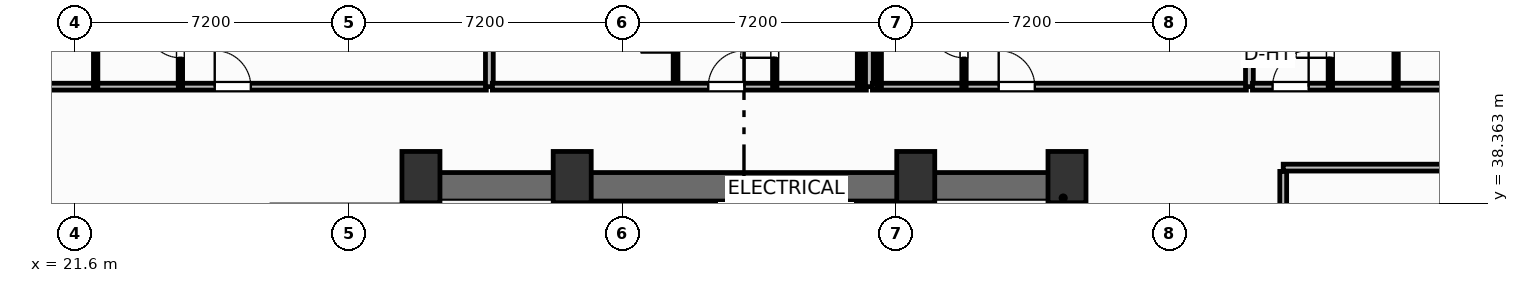
"""IFC4 building model, lengths in metres.
Left out: names, types, materials, properties, quantities, classifications, styles, units other than length and angle.
Written with IfcOpenShell. Run it as: python <this file> out.ifc"""

import sys

from ifc_helpers import new_model, si_unit, direction, frame, frame_2d, origin, origin_2d, place, context, subcontext, project, spatial, rectangle, extrude, element, fill, save


model = new_model("IFC4")
c1 = context("Model", 3, precision=1e-05, world=origin(), true_north=direction((0.0, 1.0)))
c2 = subcontext(c1, "Body", "Model", "MODEL_VIEW")
j1 = project(units=[si_unit("LENGTHUNIT", "METRE"), si_unit("PLANEANGLEUNIT", "RADIAN")], contexts=[c1])
p1 = place(None, origin())
s1 = spatial("IfcSite", under=j1, at=p1, CompositionType="ELEMENT")
p2 = place(p1, origin())
s2 = spatial("IfcBuilding", under=s1, at=p2, CompositionType="ELEMENT")
p3 = place(p2, frame((0.0, 0.0, 129.1)))
s3 = spatial("IfcBuildingStorey", under=s2, at=p3, CompositionType="ELEMENT", Elevation=129.1)
for number, where, z_axis, x_axis in (
    (1, (30.7, 39.05, 0.0), (0.0, 0.0, 1.0), (1.0, 0.0, 0.0)),
    (2, (34.68, 39.05, 0.0), (0.0, 0.0, 1.0), (1.0, 0.0, 0.0)),
    (3, (43.72, 39.05, 0.0), (0.0, 0.0, 1.0), (1.0, 0.0, 0.0)),
    (4, (47.7, 39.05, 0.0), (0.0, 0.0, 1.0), (1.0, 0.0, 0.0)),
):
    element("IfcColumn", number, at=place(p3, frame(where, z_axis=z_axis, x_axis=x_axis)), inside=s3, PredefinedType="COLUMN", context=c2, shape_type="SweptSolid", body=[
        extrude(rectangle(XDim=1.0, YDim=1.35, at=origin_2d()), origin(), (0.0, 0.0, 1.0), 3.7),
    ])
p4 = place(p3, frame((30.38, 38.795, 0.0), z_axis=(0.0, 0.0, 1.0), x_axis=(1.0, 0.0, 0.0)))
e5 = element("IfcWall", 5, at=p4, inside=s3, PredefinedType="SHEAR", context=c2, shape_type="SweptSolid", body=[
    extrude(rectangle(XDim=17.64, YDim=0.75, at=frame_2d((8.82, 0.0))), origin(), (0.0, 0.0, 1.0), 3.45),
])
for number, where, z_axis, x_axis in (
    (6, (30.755, 29.2, 0.0), (0.0, 0.0, 1.0), (0.0, 1.0, 0.0)),
    (7, (47.645, 29.2, 0.0), (0.0, 0.0, 1.0), (0.0, 1.0, 0.0)),
):
    element("IfcWall", number, at=place(p3, frame(where, z_axis=z_axis, x_axis=x_axis)), inside=s3, PredefinedType="SHEAR", context=c2, shape_type="SweptSolid", body=[
        extrude(rectangle(XDim=9.22, YDim=0.75, at=frame_2d((4.61, 0.0))), origin(), (0.0, 0.0, 1.0), 3.45),
    ])
p5 = place(p3, frame((34.64, 29.2, 0.0), z_axis=(0.0, 0.0, 1.0), x_axis=(0.0, 1.0, 0.0)))
e8 = element("IfcWall", 8, at=p5, inside=s3, PredefinedType="SHEAR", context=c2, shape_type="SweptSolid", body=[
    extrude(rectangle(XDim=9.22, YDim=0.25, at=frame_2d((4.61, 0.0))), origin(), (0.0, 0.0, 1.0), 3.45),
])
p6 = place(p5, frame((0.65, 0.0, 0.0)))
e9 = element("IfcOpeningElement", 9, at=p6, cuts=e8, PredefinedType="OPENING", context=c2, shape_type="SweptSolid", body=[
    extrude(rectangle(XDim=1.05, YDim=2.15, at=frame_2d((0.525, 1.075))), frame((0.0, 0.135, 0.0), z_axis=(0.0, -1.0, 0.0), x_axis=(1.0, 0.0, 0.0)), (0.0, 0.0, 1.0), 0.27),
])
p7 = place(p3, frame((43.76, 29.2, 0.0), z_axis=(0.0, 0.0, 1.0), x_axis=(0.0, 1.0, 0.0)))
e10 = element("IfcWall", 10, at=p7, inside=s3, PredefinedType="SHEAR", context=c2, shape_type="SweptSolid", body=[
    extrude(rectangle(XDim=9.22, YDim=0.25, at=frame_2d((4.61, 0.0))), origin(), (0.0, 0.0, 1.0), 3.45),
])
p8 = place(p7, frame((0.65, 0.0, 0.0)))
e11 = element("IfcOpeningElement", 11, at=p8, cuts=e10, PredefinedType="OPENING", context=c2, shape_type="SweptSolid", body=[
    extrude(rectangle(XDim=1.05, YDim=2.15, at=frame_2d((0.525, 1.075))), frame((0.0, 0.135, 0.0), z_axis=(0.0, -1.0, 0.0), x_axis=(1.0, 0.0, 0.0)), (0.0, 0.0, 1.0), 0.27),
])
p9 = place(p3, frame((3.864, 41.43, 0.0), z_axis=(0.0, 0.0, 1.0), x_axis=(1.0, 0.0, 0.0)))
e12 = element("IfcWall", 12, at=p9, inside=s3, PredefinedType="PARTITIONING", context=c2, shape_type="SweptSolid", body=[
    extrude(rectangle(XDim=28.556, YDim=0.18, at=frame_2d((14.278, 0.0))), origin(), (0.0, 0.0, 1.0), 3.45),
])
p10 = place(p9, frame((21.409, 0.0, 0.0)))
e13 = element("IfcOpeningElement", 13, at=p10, cuts=e12, PredefinedType="OPENING", context=c2, shape_type="SweptSolid", body=[
    extrude(rectangle(XDim=0.95, YDim=2.15, at=frame_2d((0.475, 1.075))), frame((0.0, 0.1, 0.0), z_axis=(0.0, -1.0, 0.0), x_axis=(1.0, 0.0, 0.0)), (0.0, 0.0, 1.0), 0.2),
])
p11 = place(p3, frame((24.37, 41.43, 0.0), z_axis=(0.0, 0.0, 1.0), x_axis=(0.0, 1.0, 0.0)))
e14 = element("IfcWall", 14, at=p11, inside=s3, PredefinedType="PARTITIONING", context=c2, shape_type="SweptSolid", body=[
    extrude(rectangle(XDim=2.52, YDim=0.115, at=frame_2d((1.26, 0.0))), origin(), (0.0, 0.0, 1.0), 3.45),
])
p12 = place(p11, frame((0.76, 0.0, 0.0)))
e15 = element("IfcOpeningElement", 15, at=p12, cuts=e14, PredefinedType="OPENING", context=c2, shape_type="SweptSolid", body=[
    extrude(rectangle(XDim=0.9, YDim=2.05, at=frame_2d((0.45, 1.025))), frame((0.0, 0.067, 0.0), z_axis=(0.0, -1.0, 0.0), x_axis=(1.0, 0.0, 0.0)), (0.0, 0.0, 1.0), 0.135),
])
p13 = place(p3, frame((22.14, 41.43, 0.0), z_axis=(0.0, 0.0, 1.0), x_axis=(0.0, 1.0, 0.0)))
e16 = element("IfcWall", 16, at=p13, inside=s3, PredefinedType="PARTITIONING", context=c2, shape_type="SweptSolid", body=[
    extrude(rectangle(XDim=2.52, YDim=0.115, at=frame_2d((1.26, 0.0))), origin(), (0.0, 0.0, 1.0), 3.45),
])
p14 = place(p3, frame((32.5, 41.43, 0.0), z_axis=(0.0, 0.0, 1.0), x_axis=(0.0, 1.0, 0.0)))
e17 = element("IfcWall", 17, at=p14, inside=s3, PredefinedType="PARTITIONING", context=c2, shape_type="SweptSolid", body=[
    extrude(rectangle(XDim=5.997, YDim=0.205, at=frame_2d((2.999, 0.0))), origin(), (0.0, 0.0, 1.0), 2.662),
])
p15 = place(p3, frame((37.4, 41.43, 0.0), z_axis=(0.0, 0.0, 1.0), x_axis=(0.0, 1.0, 0.0)))
e18 = element("IfcWall", 18, at=p15, inside=s3, PredefinedType="PARTITIONING", context=c2, shape_type="SweptSolid", body=[
    extrude(rectangle(XDim=5.403, YDim=0.125, at=frame_2d((2.702, 0.0))), origin(), (0.0, 0.0, 1.0), 3.45),
])
p16 = place(p15, frame((0.897, 0.0, 0.0)))
e19 = element("IfcOpeningElement", 19, at=p16, cuts=e18, PredefinedType="OPENING", context=c2, shape_type="SweptSolid", body=[
    extrude(rectangle(XDim=0.92, YDim=2.05, at=frame_2d((0.46, 1.025))), frame((0.0, 0.073, 0.0), z_axis=(0.0, -1.0, 0.0), x_axis=(1.0, 0.0, 0.0)), (0.0, 0.0, 1.0), 0.145),
])
p17 = place(p3, frame((32.58, 41.43, 0.0), z_axis=(0.0, 0.0, 1.0), x_axis=(1.0, 0.0, 0.0)))
e20 = element("IfcWall", 20, at=p17, inside=s3, PredefinedType="PARTITIONING", context=c2, shape_type="SweptSolid", body=[
    extrude(rectangle(XDim=9.84, YDim=0.18, at=frame_2d((4.92, 0.0))), origin(), (0.0, 0.0, 1.0), 3.45),
])
p18 = place(p17, frame((5.68, 0.0, 0.0)))
e21 = element("IfcOpeningElement", 21, at=p18, cuts=e20, PredefinedType="OPENING", context=c2, shape_type="SweptSolid", body=[
    extrude(rectangle(XDim=0.95, YDim=2.15, at=frame_2d((0.475, 1.075))), frame((0.0, 0.1, 0.0), z_axis=(0.0, -1.0, 0.0), x_axis=(1.0, 0.0, 0.0)), (0.0, 0.0, 1.0), 0.2),
])
p19 = place(p3, frame((40.01, 41.43, 0.0), z_axis=(0.0, 0.0, 1.0), x_axis=(0.0, 1.0, 0.0)))
e22 = element("IfcWall", 22, at=p19, inside=s3, PredefinedType="PARTITIONING", context=c2, shape_type="SweptSolid", body=[
    extrude(rectangle(XDim=2.52, YDim=0.115, at=frame_2d((1.26, 0.0))), origin(), (0.0, 0.0, 1.0), 3.45),
])
p20 = place(p19, frame((0.76, 0.0, 0.0)))
e23 = element("IfcOpeningElement", 23, at=p20, cuts=e22, PredefinedType="OPENING", context=c2, shape_type="SweptSolid", body=[
    extrude(rectangle(XDim=0.9, YDim=2.05, at=frame_2d((0.45, 1.025))), frame((0.0, 0.067, 0.0), z_axis=(0.0, -1.0, 0.0), x_axis=(1.0, 0.0, 0.0)), (0.0, 0.0, 1.0), 0.135),
])
p21 = place(p3, frame((42.24, 41.43, 0.0), z_axis=(0.0, 0.0, 1.0), x_axis=(0.0, 1.0, 0.0)))
e24 = element("IfcWall", 24, at=p21, inside=s3, PredefinedType="PARTITIONING", context=c2, shape_type="SweptSolid", body=[
    extrude(rectangle(XDim=2.52, YDim=0.115, at=frame_2d((1.26, 0.0))), origin(), (0.0, 0.0, 1.0), 2.662),
])
p22 = place(p3, frame((42.5, 41.43, 0.0), z_axis=(0.0, 0.0, 1.0), x_axis=(0.0, 1.0, 0.0)))
e25 = element("IfcWall", 25, at=p22, inside=s3, PredefinedType="PARTITIONING", context=c2, shape_type="SweptSolid", body=[
    extrude(rectangle(XDim=6.9, YDim=0.205, at=frame_2d((3.45, 0.0))), origin(), (0.0, 0.0, 1.0), 2.662),
])
p23 = place(p3, frame((42.58, 41.43, 0.0), z_axis=(0.0, 0.0, 1.0), x_axis=(1.0, 0.0, 0.0)))
e26 = element("IfcWall", 26, at=p23, inside=s3, PredefinedType="PARTITIONING", context=c2, shape_type="SweptSolid", body=[
    extrude(rectangle(XDim=9.84, YDim=0.18, at=frame_2d((4.92, 0.0))), origin(), (0.0, 0.0, 1.0), 3.45),
])
p24 = place(p23, frame((3.323, 0.0, 0.0)))
e27 = element("IfcOpeningElement", 27, at=p24, cuts=e26, PredefinedType="OPENING", context=c2, shape_type="SweptSolid", body=[
    extrude(rectangle(XDim=0.95, YDim=2.15, at=frame_2d((0.475, 1.075))), frame((0.0, 0.1, 0.0), z_axis=(0.0, -1.0, 0.0), x_axis=(1.0, 0.0, 0.0)), (0.0, 0.0, 1.0), 0.2),
])
p25 = place(p3, frame((44.99, 41.43, 0.0), z_axis=(0.0, 0.0, 1.0), x_axis=(0.0, 1.0, 0.0)))
e28 = element("IfcWall", 28, at=p25, inside=s3, PredefinedType="PARTITIONING", context=c2, shape_type="SweptSolid", body=[
    extrude(rectangle(XDim=2.52, YDim=0.115, at=frame_2d((1.26, 0.0))), origin(), (0.0, 0.0, 1.0), 3.45),
])
p26 = place(p25, frame((0.76, 0.0, 0.0)))
e29 = element("IfcOpeningElement", 29, at=p26, cuts=e28, PredefinedType="OPENING", context=c2, shape_type="SweptSolid", body=[
    extrude(rectangle(XDim=0.9, YDim=2.05, at=frame_2d((0.45, 1.025))), frame((0.0, 0.067, 0.0), z_axis=(0.0, -1.0, 0.0), x_axis=(1.0, 0.0, 0.0)), (0.0, 0.0, 1.0), 0.135),
])
p27 = place(p3, frame((42.76, 41.43, 0.0), z_axis=(0.0, 0.0, 1.0), x_axis=(0.0, 1.0, 0.0)))
e30 = element("IfcWall", 30, at=p27, inside=s3, PredefinedType="PARTITIONING", context=c2, shape_type="SweptSolid", body=[
    extrude(rectangle(XDim=2.52, YDim=0.115, at=frame_2d((1.26, 0.0))), origin(), (0.0, 0.0, 1.0), 2.662),
])
p28 = place(p3, frame((52.5, 41.43, 0.0), z_axis=(0.0, 0.0, 1.0), x_axis=(0.0, 1.0, 0.0)))
e31 = element("IfcWall", 31, at=p28, inside=s3, PredefinedType="PARTITIONING", context=c2, shape_type="SweptSolid", body=[
    extrude(rectangle(XDim=5.688, YDim=0.205, at=frame_2d((2.844, 0.0))), origin(), (0.0, 0.0, 1.0), 3.45),
])
p29 = place(p3, frame((52.58, 41.43, 0.0), z_axis=(0.0, 0.0, 1.0), x_axis=(1.0, 0.0, 0.0)))
e32 = element("IfcWall", 32, at=p29, inside=s3, PredefinedType="PARTITIONING", context=c2, shape_type="SweptSolid", body=[
    extrude(rectangle(XDim=21.74, YDim=0.18, at=frame_2d((10.87, 0.0))), origin(), (0.0, 0.0, 1.0), 3.45),
])
p30 = place(p29, frame((0.529, 0.0, 0.0)))
e33 = element("IfcOpeningElement", 33, at=p30, cuts=e32, PredefinedType="OPENING", context=c2, shape_type="SweptSolid", body=[
    extrude(rectangle(XDim=0.95, YDim=2.15, at=frame_2d((0.475, 1.075))), frame((0.0, 0.1, 0.0), z_axis=(0.0, -1.0, 0.0), x_axis=(1.0, 0.0, 0.0)), (0.0, 0.0, 1.0), 0.2),
])
p31 = place(p3, frame((54.63, 41.43, 0.0), z_axis=(0.0, 0.0, 1.0), x_axis=(0.0, 1.0, 0.0)))
e34 = element("IfcWall", 34, at=p31, inside=s3, PredefinedType="PARTITIONING", context=c2, shape_type="SweptSolid", body=[
    extrude(rectangle(XDim=2.52, YDim=0.115, at=frame_2d((1.26, 0.0))), origin(), (0.0, 0.0, 1.0), 3.45),
])
p32 = place(p31, frame((0.76, 0.0, 0.0)))
e35 = element("IfcOpeningElement", 35, at=p32, cuts=e34, PredefinedType="OPENING", context=c2, shape_type="SweptSolid", body=[
    extrude(rectangle(XDim=0.9, YDim=2.05, at=frame_2d((0.45, 1.025))), frame((0.0, 0.067, 0.0), z_axis=(0.0, -1.0, 0.0), x_axis=(1.0, 0.0, 0.0)), (0.0, 0.0, 1.0), 0.135),
])
p33 = place(p3, frame((56.36, 41.43, 0.0), z_axis=(0.0, 0.0, 1.0), x_axis=(0.0, 1.0, 0.0)))
e36 = element("IfcWall", 36, at=p33, inside=s3, PredefinedType="PARTITIONING", context=c2, shape_type="SweptSolid", body=[
    extrude(rectangle(XDim=2.52, YDim=0.115, at=frame_2d((1.26, 0.0))), origin(), (0.0, 0.0, 1.0), 3.45),
])
p34 = place(p3, frame((53.39, 27.53, 0.0), z_axis=(0.0, 0.0, 1.0), x_axis=(0.0, 1.0, 0.0)))
e37 = element("IfcWall", 37, at=p34, inside=s3, PredefinedType="PARTITIONING", context=c2, shape_type="SweptSolid", body=[
    extrude(rectangle(XDim=11.67, YDim=0.18, at=frame_2d((5.835, 0.0))), origin(), (0.0, 0.0, 1.0), 3.45),
])
p35 = place(p34, frame((5.8, 0.0, 0.0)))
e38 = element("IfcOpeningElement", 38, at=p35, cuts=e37, PredefinedType="OPENING", context=c2, shape_type="SweptSolid", body=[
    extrude(rectangle(XDim=0.92, YDim=2.05, at=frame_2d((0.46, 1.025))), frame((0.0, 0.1, 0.0), z_axis=(0.0, -1.0, 0.0), x_axis=(1.0, 0.0, 0.0)), (0.0, 0.0, 1.0), 0.2),
])
p36 = place(p3, frame((53.39, 39.3, 0.0), z_axis=(0.0, 0.0, 1.0), x_axis=(1.0, 0.0, 0.0)))
e39 = element("IfcWall", 39, at=p36, inside=s3, PredefinedType="PARTITIONING", context=c2, shape_type="SweptSolid", body=[
    extrude(rectangle(XDim=24.74, YDim=0.18, at=frame_2d((12.37, 0.0))), origin(), (0.0, 0.0, 1.0), 3.45),
])
p37 = place(p10, origin())
e40 = element("IfcDoor", 40, at=p37, inside=s3, OperationType="SINGLE_SWING_LEFT", PredefinedType="DOOR", context=c2, shape_type="SweptSolid", body=[
    extrude(rectangle(XDim=0.95, YDim=2.15, at=frame_2d((0.475, 1.075))), frame((0.0, 0.025, 0.0), z_axis=(0.0, -1.0, 0.0), x_axis=(1.0, 0.0, 0.0)), (0.0, 0.0, 1.0), 0.05),
])
fill(e13, e40)
p38 = place(p12, origin())
e41 = element("IfcDoor", 41, at=p38, inside=s3, OperationType="SINGLE_SWING_RIGHT", PredefinedType="DOOR", context=c2, shape_type="SweptSolid", body=[
    extrude(rectangle(XDim=0.9, YDim=2.05, at=frame_2d((0.45, 1.025))), frame((0.0, 0.025, 0.0), z_axis=(0.0, -1.0, 0.0), x_axis=(1.0, 0.0, 0.0)), (0.0, 0.0, 1.0), 0.05),
])
fill(e15, e41)
p39 = place(p16, origin())
e42 = element("IfcDoor", 42, at=p39, inside=s3, OperationType="SINGLE_SWING_LEFT", PredefinedType="DOOR", context=c2, shape_type="SweptSolid", body=[
    extrude(rectangle(XDim=0.92, YDim=2.05, at=frame_2d((0.46, 1.025))), frame((0.0, 0.025, 0.0), z_axis=(0.0, -1.0, 0.0), x_axis=(1.0, 0.0, 0.0)), (0.0, 0.0, 1.0), 0.05),
])
fill(e19, e42)
p40 = place(p18, origin())
e43 = element("IfcDoor", 43, at=p40, inside=s3, OperationType="SINGLE_SWING_RIGHT", PredefinedType="DOOR", context=c2, shape_type="SweptSolid", body=[
    extrude(rectangle(XDim=0.95, YDim=2.15, at=frame_2d((0.475, 1.075))), frame((0.0, 0.025, 0.0), z_axis=(0.0, -1.0, 0.0), x_axis=(1.0, 0.0, 0.0)), (0.0, 0.0, 1.0), 0.05),
])
fill(e21, e43)
p41 = place(p20, origin())
e44 = element("IfcDoor", 44, at=p41, inside=s3, OperationType="SINGLE_SWING_LEFT", PredefinedType="DOOR", context=c2, shape_type="SweptSolid", body=[
    extrude(rectangle(XDim=0.9, YDim=2.05, at=frame_2d((0.45, 1.025))), frame((0.0, 0.025, 0.0), z_axis=(0.0, -1.0, 0.0), x_axis=(1.0, 0.0, 0.0)), (0.0, 0.0, 1.0), 0.05),
])
fill(e23, e44)
p42 = place(p24, origin())
e45 = element("IfcDoor", 45, at=p42, inside=s3, OperationType="SINGLE_SWING_LEFT", PredefinedType="DOOR", context=c2, shape_type="SweptSolid", body=[
    extrude(rectangle(XDim=0.95, YDim=2.15, at=frame_2d((0.475, 1.075))), frame((0.0, 0.025, 0.0), z_axis=(0.0, -1.0, 0.0), x_axis=(1.0, 0.0, 0.0)), (0.0, 0.0, 1.0), 0.05),
])
fill(e27, e45)
p43 = place(p26, origin())
e46 = element("IfcDoor", 46, at=p43, inside=s3, OperationType="SINGLE_SWING_RIGHT", PredefinedType="DOOR", context=c2, shape_type="SweptSolid", body=[
    extrude(rectangle(XDim=0.9, YDim=2.05, at=frame_2d((0.45, 1.025))), frame((0.0, 0.025, 0.0), z_axis=(0.0, -1.0, 0.0), x_axis=(1.0, 0.0, 0.0)), (0.0, 0.0, 1.0), 0.05),
])
fill(e29, e46)
p44 = place(p30, origin())
e47 = element("IfcDoor", 47, at=p44, inside=s3, OperationType="SINGLE_SWING_RIGHT", PredefinedType="DOOR", context=c2, shape_type="SweptSolid", body=[
    extrude(rectangle(XDim=0.95, YDim=2.15, at=frame_2d((0.475, 1.075))), frame((0.0, 0.025, 0.0), z_axis=(0.0, -1.0, 0.0), x_axis=(1.0, 0.0, 0.0)), (0.0, 0.0, 1.0), 0.05),
])
fill(e33, e47)
p45 = place(p32, origin())
e48 = element("IfcDoor", 48, at=p45, inside=s3, OperationType="SINGLE_SWING_LEFT", PredefinedType="DOOR", context=c2, shape_type="SweptSolid", body=[
    extrude(rectangle(XDim=0.9, YDim=2.05, at=frame_2d((0.45, 1.025))), frame((0.0, 0.025, 0.0), z_axis=(0.0, -1.0, 0.0), x_axis=(1.0, 0.0, 0.0)), (0.0, 0.0, 1.0), 0.05),
])
fill(e35, e48)
save(model, sys.argv[1])
